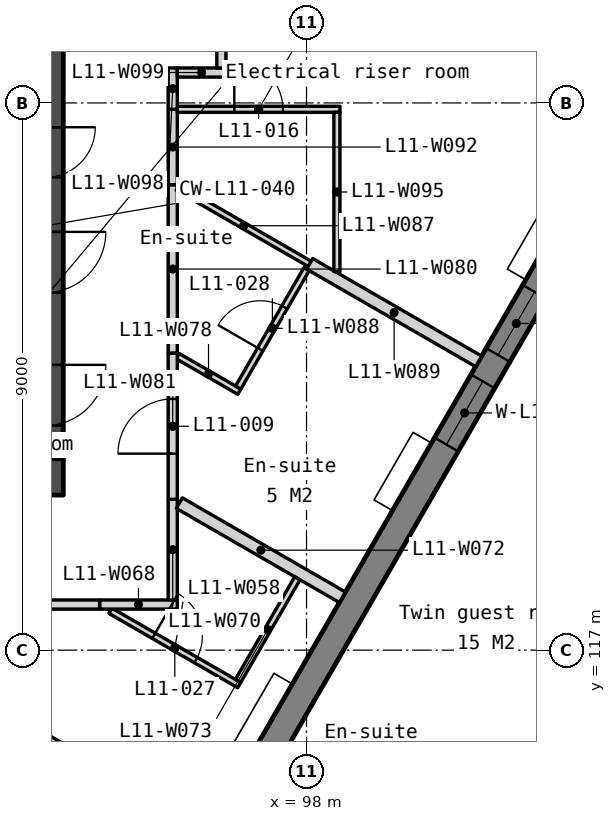
"""IFC4 building model, lengths in metres.
Left out: names, types, materials, properties, quantities, classifications, styles, units other than length and angle.
Written with IfcOpenShell. Run it as: python <this file> out.ifc"""

import sys

from ifc_helpers import new_model, si_unit, direction, frame, frame_2d, origin, place, context, subcontext, project, spatial, polyline, rectangle, outline, extrude, element, fill, save


model = new_model("IFC4")
c1 = context("Model", 3, precision=1e-05, world=origin(), true_north=direction((0.0, 1.0)))
c2 = subcontext(c1, "Body", "Model", "MODEL_VIEW")
j1 = project(units=[si_unit("LENGTHUNIT", "METRE"), si_unit("PLANEANGLEUNIT", "RADIAN")], contexts=[c1])
p1 = place(None, origin())
s1 = spatial("IfcSite", under=j1, at=p1, CompositionType="ELEMENT")
p2 = place(p1, origin())
s2 = spatial("IfcBuilding", under=s1, at=p2, CompositionType="ELEMENT")
p3 = place(p2, frame((0.0, 0.0, 52.5)))
s3 = spatial("IfcBuildingStorey", under=s2, at=p3, CompositionType="ELEMENT", Elevation=52.5)
p4 = place(p3, frame((66.0, 119.85, 0.0), z_axis=(0.0, 0.0, 1.0), x_axis=(1.0, 0.0, 0.0)))
e1 = element("IfcWall", 1, at=p4, inside=s3, PredefinedType="SOLIDWALL", context=c2, shape_type="SweptSolid", body=[
    extrude(rectangle(XDim=28.0, YDim=0.6, at=frame_2d((14.0, 0.0))), origin(), (0.0, 0.0, 1.0), 3.35),
])
p5 = place(p4, frame((6.825, 0.0, 0.0)))
e2 = element("IfcOpeningElement", 2, at=p5, cuts=e1, PredefinedType="OPENING", context=c2, shape_type="SweptSolid", body=[
    extrude(rectangle(XDim=1.8, YDim=2.1, at=frame_2d((0.9, 1.05))), frame((0.0, 0.31, 0.0), z_axis=(0.0, -1.0, 0.0), x_axis=(1.0, 0.0, 0.0)), (0.0, 0.0, 1.0), 0.62),
])
p6 = place(p4, frame((15.85, 0.0, 0.0)))
e3 = element("IfcOpeningElement", 3, at=p6, cuts=e1, PredefinedType="OPENING", context=c2, shape_type="SweptSolid", body=[
    extrude(rectangle(XDim=1.5, YDim=2.1, at=frame_2d((0.75, 1.05))), frame((0.0, 0.31, 0.0), z_axis=(0.0, -1.0, 0.0), x_axis=(1.0, 0.0, 0.0)), (0.0, 0.0, 1.0), 0.62),
])
p7 = place(p4, frame((19.375, 0.0, 0.0)))
e4 = element("IfcOpeningElement", 4, at=p7, cuts=e1, PredefinedType="OPENING", context=c2, shape_type="SweptSolid", body=[
    extrude(rectangle(XDim=1.8, YDim=2.1, at=frame_2d((0.9, 1.05))), frame((0.0, 0.31, 0.0), z_axis=(0.0, -1.0, 0.0), x_axis=(1.0, 0.0, 0.0)), (0.0, 0.0, 1.0), 0.62),
])
p8 = place(p4, frame((4.425, 0.0, 0.0)))
e5 = element("IfcOpeningElement", 5, at=p8, cuts=e1, PredefinedType="OPENING", context=c2, shape_type="SweptSolid", body=[
    extrude(rectangle(XDim=1.0, YDim=2.1, at=frame_2d((0.5, 1.05))), frame((0.0, 0.31, 0.0), z_axis=(0.0, -1.0, 0.0), x_axis=(1.0, 0.0, 0.0)), (0.0, 0.0, 1.0), 0.62),
])
p9 = place(p4, frame((9.783, 0.0, 0.0)))
e6 = element("IfcOpeningElement", 6, at=p9, cuts=e1, PredefinedType="OPENING", context=c2, shape_type="SweptSolid", body=[
    extrude(rectangle(XDim=1.0, YDim=2.1, at=frame_2d((0.5, 1.05))), frame((0.0, 0.31, 0.0), z_axis=(0.0, -1.0, 0.0), x_axis=(1.0, 0.0, 0.0)), (0.0, 0.0, 1.0), 0.62),
])
p10 = place(p4, frame((11.525, 0.0, 0.0)))
e7 = element("IfcOpeningElement", 7, at=p10, cuts=e1, PredefinedType="OPENING", context=c2, shape_type="SweptSolid", body=[
    extrude(rectangle(XDim=1.0, YDim=2.1, at=frame_2d((0.5, 1.05))), frame((0.0, 0.31, 0.0), z_axis=(0.0, -1.0, 0.0), x_axis=(1.0, 0.0, 0.0)), (0.0, 0.0, 1.0), 0.62),
])
p11 = place(p4, frame((13.658, 0.0, 0.0)))
e8 = element("IfcOpeningElement", 8, at=p11, cuts=e1, PredefinedType="OPENING", context=c2, shape_type="SweptSolid", body=[
    extrude(rectangle(XDim=1.0, YDim=2.1, at=frame_2d((0.5, 1.05))), frame((0.0, 0.31, 0.0), z_axis=(0.0, -1.0, 0.0), x_axis=(1.0, 0.0, 0.0)), (0.0, 0.0, 1.0), 0.62),
])
p12 = place(p4, frame((21.725, 0.0, 0.0)))
e9 = element("IfcOpeningElement", 9, at=p12, cuts=e1, PredefinedType="OPENING", context=c2, shape_type="SweptSolid", body=[
    extrude(rectangle(XDim=1.0, YDim=2.1, at=frame_2d((0.5, 1.05))), frame((0.0, 0.31, 0.0), z_axis=(0.0, -1.0, 0.0), x_axis=(1.0, 0.0, 0.0)), (0.0, 0.0, 1.0), 0.62),
])
p13 = place(p4, frame((23.425, 0.0, 0.0)))
e10 = element("IfcOpeningElement", 10, at=p13, cuts=e1, PredefinedType="OPENING", context=c2, shape_type="SweptSolid", body=[
    extrude(rectangle(XDim=1.0, YDim=2.1, at=frame_2d((0.5, 1.05))), frame((0.0, 0.31, 0.0), z_axis=(0.0, -1.0, 0.0), x_axis=(1.0, 0.0, 0.0)), (0.0, 0.0, 1.0), 0.62),
])
p14 = place(p3, frame((93.7, 133.95, 0.0), z_axis=(0.0, 0.0, 1.0), x_axis=(0.0, -1.0, 0.0)))
e11 = element("IfcWall", 11, at=p14, inside=s3, PredefinedType="SOLIDWALL", context=c2, shape_type="SweptSolid", body=[
    extrude(rectangle(XDim=13.8, YDim=0.6, at=frame_2d((6.9, 0.0))), origin(), (0.0, 0.0, 1.0), 3.35),
])
p15 = place(p14, frame((0.6, 0.0, 0.0)))
e12 = element("IfcOpeningElement", 12, at=p15, cuts=e11, PredefinedType="OPENING", context=c2, shape_type="SweptSolid", body=[
    extrude(rectangle(XDim=1.1, YDim=2.1, at=frame_2d((0.55, 1.05))), frame((0.0, 0.31, 0.0), z_axis=(0.0, -1.0, 0.0), x_axis=(1.0, 0.0, 0.0)), (0.0, 0.0, 1.0), 0.62),
])
p16 = place(p14, frame((8.35, 0.0, 0.0)))
e13 = element("IfcOpeningElement", 13, at=p16, cuts=e11, PredefinedType="OPENING", context=c2, shape_type="SweptSolid", body=[
    extrude(rectangle(XDim=0.826, YDim=2.1, at=frame_2d((0.413, 1.05))), frame((0.0, 0.31, 0.0), z_axis=(0.0, -1.0, 0.0), x_axis=(1.0, 0.0, 0.0)), (0.0, 0.0, 1.0), 0.62),
])
p17 = place(p14, frame((10.071, 0.0, 0.0)))
e14 = element("IfcOpeningElement", 14, at=p17, cuts=e11, PredefinedType="OPENING", context=c2, shape_type="SweptSolid", body=[
    extrude(rectangle(XDim=1.0, YDim=2.1, at=frame_2d((0.5, 1.05))), frame((0.0, 0.31, 0.0), z_axis=(0.0, -1.0, 0.0), x_axis=(1.0, 0.0, 0.0)), (0.0, 0.0, 1.0), 0.62),
])
p18 = place(p14, frame((12.258, 0.0, 0.0)))
e15 = element("IfcOpeningElement", 15, at=p18, cuts=e11, PredefinedType="OPENING", context=c2, shape_type="SweptSolid", body=[
    extrude(rectangle(XDim=1.0, YDim=2.1, at=frame_2d((0.5, 1.05))), frame((0.0, 0.31, 0.0), z_axis=(0.0, -1.0, 0.0), x_axis=(1.0, 0.0, 0.0)), (0.0, 0.0, 1.0), 0.62),
])
p19 = place(p3, frame((83.105, 90.599, -0.15), z_axis=(0.0, 0.0, 1.0), x_axis=(0.499999201451, 0.866025864826, 0.0)))
e16 = element("IfcWall", 16, at=p19, inside=s3, PredefinedType="SOLIDWALL", context=c2, shape_type="SweptSolid", body=[
    extrude(outline(polyline([(44.8, 0.0), (44.8, 3.5), (0.0, 3.5), (0.0, 0.0), (44.8, 0.0)])), frame((0.0, 0.225, 0.0), z_axis=(0.0, -1.0, 0.0), x_axis=(1.0, 0.0, 0.0)), (0.0, 0.0, 1.0), 0.45),
])
p20 = place(p19, frame((0.722, 0.0, 1.05)))
e17 = element("IfcOpeningElement", 17, at=p20, cuts=e16, PredefinedType="OPENING", context=c2, shape_type="SweptSolid", body=[
    extrude(rectangle(XDim=1.2, YDim=1.5, at=frame_2d((0.6, 0.75))), frame((0.0, 0.235, 0.0), z_axis=(0.0, -1.0, 0.0), x_axis=(1.0, 0.0, 0.0)), (0.0, 0.0, 1.0), 0.47),
])
p21 = place(p19, frame((7.51, 0.0, 1.05)))
e18 = element("IfcOpeningElement", 18, at=p21, cuts=e16, PredefinedType="OPENING", context=c2, shape_type="SweptSolid", body=[
    extrude(rectangle(XDim=1.2, YDim=1.5, at=frame_2d((0.6, 0.75))), frame((0.0, 0.235, 0.0), z_axis=(0.0, -1.0, 0.0), x_axis=(1.0, 0.0, 0.0)), (0.0, 0.0, 1.0), 0.47),
])
p22 = place(p19, frame((9.21, 0.0, 1.05)))
e19 = element("IfcOpeningElement", 19, at=p22, cuts=e16, PredefinedType="OPENING", context=c2, shape_type="SweptSolid", body=[
    extrude(rectangle(XDim=1.2, YDim=1.5, at=frame_2d((0.6, 0.75))), frame((0.0, 0.235, 0.0), z_axis=(0.0, -1.0, 0.0), x_axis=(1.0, 0.0, 0.0)), (0.0, 0.0, 1.0), 0.47),
])
p23 = place(p19, frame((16.47, 0.0, 1.05)))
e20 = element("IfcOpeningElement", 20, at=p23, cuts=e16, PredefinedType="OPENING", context=c2, shape_type="SweptSolid", body=[
    extrude(rectangle(XDim=1.2, YDim=1.5, at=frame_2d((0.6, 0.75))), frame((0.0, 0.235, 0.0), z_axis=(0.0, -1.0, 0.0), x_axis=(1.0, 0.0, 0.0)), (0.0, 0.0, 1.0), 0.47),
])
p24 = place(p19, frame((18.17, 0.0, 1.05)))
e21 = element("IfcOpeningElement", 21, at=p24, cuts=e16, PredefinedType="OPENING", context=c2, shape_type="SweptSolid", body=[
    extrude(rectangle(XDim=1.2, YDim=1.5, at=frame_2d((0.6, 0.75))), frame((0.0, 0.235, 0.0), z_axis=(0.0, -1.0, 0.0), x_axis=(1.0, 0.0, 0.0)), (0.0, 0.0, 1.0), 0.47),
])
p25 = place(p19, frame((25.43, 0.0, 1.05)))
e22 = element("IfcOpeningElement", 22, at=p25, cuts=e16, PredefinedType="OPENING", context=c2, shape_type="SweptSolid", body=[
    extrude(rectangle(XDim=1.2, YDim=1.5, at=frame_2d((0.6, 0.75))), frame((0.0, 0.235, 0.0), z_axis=(0.0, -1.0, 0.0), x_axis=(1.0, 0.0, 0.0)), (0.0, 0.0, 1.0), 0.47),
])
p26 = place(p19, frame((27.13, 0.0, 1.05)))
e23 = element("IfcOpeningElement", 23, at=p26, cuts=e16, PredefinedType="OPENING", context=c2, shape_type="SweptSolid", body=[
    extrude(rectangle(XDim=1.2, YDim=1.5, at=frame_2d((0.6, 0.75))), frame((0.0, 0.235, 0.0), z_axis=(0.0, -1.0, 0.0), x_axis=(1.0, 0.0, 0.0)), (0.0, 0.0, 1.0), 0.47),
])
p27 = place(p19, frame((34.39, 0.0, 1.05)))
e24 = element("IfcOpeningElement", 24, at=p27, cuts=e16, PredefinedType="OPENING", context=c2, shape_type="SweptSolid", body=[
    extrude(rectangle(XDim=1.2, YDim=1.5, at=frame_2d((0.6, 0.75))), frame((0.0, 0.235, 0.0), z_axis=(0.0, -1.0, 0.0), x_axis=(1.0, 0.0, 0.0)), (0.0, 0.0, 1.0), 0.47),
])
p28 = place(p19, frame((36.09, 0.0, 1.05)))
e25 = element("IfcOpeningElement", 25, at=p28, cuts=e16, PredefinedType="OPENING", context=c2, shape_type="SweptSolid", body=[
    extrude(rectangle(XDim=1.2, YDim=1.5, at=frame_2d((0.6, 0.75))), frame((0.0, 0.235, 0.0), z_axis=(0.0, -1.0, 0.0), x_axis=(1.0, 0.0, 0.0)), (0.0, 0.0, 1.0), 0.47),
])
p29 = place(p19, frame((42.878, 0.0, 1.05)))
e26 = element("IfcOpeningElement", 26, at=p29, cuts=e16, PredefinedType="OPENING", context=c2, shape_type="SweptSolid", body=[
    extrude(rectangle(XDim=1.2, YDim=1.5, at=frame_2d((0.6, 0.75))), frame((0.0, 0.235, 0.0), z_axis=(0.0, -1.0, 0.0), x_axis=(1.0, 0.0, 0.0)), (0.0, 0.0, 1.0), 0.47),
])
p30 = place(p3, frame((92.497, 116.215, 0.0), z_axis=(0.0, 0.0, 1.0), x_axis=(0.866012907634, -0.500021643343, 0.0)))
e27 = element("IfcWall", 27, at=p30, inside=s3, PredefinedType="PARTITIONING", context=c2, shape_type="SweptSolid", body=[
    extrude(rectangle(XDim=4.45, YDim=0.2, at=frame_2d((2.225, 0.0))), origin(), (0.0, 0.0, 1.0), 3.35),
])
p31 = place(p3, frame((94.775, 117.647, 0.0), z_axis=(0.0, 0.0, 1.0), x_axis=(0.86604092097, -0.499973122483, 0.0)))
e28 = element("IfcWall", 28, at=p31, inside=s3, PredefinedType="PARTITIONING", context=c2, shape_type="SweptSolid", body=[
    extrude(rectangle(XDim=2.445, YDim=0.1, at=frame_2d((1.223, 0.0))), origin(), (0.0, 0.0, 1.0), 3.35),
])
p32 = place(p31, frame((0.823, 0.0, 0.0)))
e29 = element("IfcOpeningElement", 29, at=p32, cuts=e28, PredefinedType="OPENING", context=c2, shape_type="SweptSolid", body=[
    extrude(rectangle(XDim=0.8, YDim=2.1, at=frame_2d((0.4, 1.05))), frame((0.0, 0.06, 0.0), z_axis=(0.0, -1.0, 0.0), x_axis=(1.0, 0.0, 0.0)), (0.0, 0.0, 1.0), 0.12),
])
p33 = place(p3, frame((94.598, 117.75, 0.0), z_axis=(0.0, 0.0, 1.0), x_axis=(1.0, 0.0, 0.0)))
e30 = element("IfcWall", 30, at=p33, inside=s3, PredefinedType="PARTITIONING", context=c2, shape_type="SweptSolid", body=[
    extrude(rectangle(XDim=1.277, YDim=0.15, at=frame_2d((0.639, 0.0))), origin(), (0.0, 0.0, 1.0), 3.35),
])
p34 = place(p3, frame((90.034, 117.75, 0.0), z_axis=(0.0, 0.0, 1.0), x_axis=(1.0, 0.0, 0.0)))
e31 = element("IfcWall", 31, at=p34, inside=s3, PredefinedType="PARTITIONING", context=c2, shape_type="SweptSolid", body=[
    extrude(rectangle(XDim=4.564, YDim=0.15, at=frame_2d((2.282, 0.0))), origin(), (0.0, 0.0, 1.0), 3.35),
])
p35 = place(p34, frame((1.832, 0.0, 0.0)))
e32 = element("IfcOpeningElement", 32, at=p35, cuts=e31, PredefinedType="OPENING", context=c2, shape_type="SweptSolid", body=[
    extrude(rectangle(XDim=0.9, YDim=2.1, at=frame_2d((0.45, 1.05))), frame((0.0, 0.085, 0.0), z_axis=(0.0, -1.0, 0.0), x_axis=(1.0, 0.0, 0.0)), (0.0, 0.0, 1.0), 0.17),
])
p36 = place(p3, frame((95.8, 117.825, 0.0), z_axis=(0.0, 0.0, 1.0), x_axis=(0.0, 1.0, 0.0)))
e33 = element("IfcWall", 33, at=p36, inside=s3, PredefinedType="PARTITIONING", context=c2, shape_type="SweptSolid", body=[
    extrude(rectangle(XDim=1.656, YDim=0.15, at=frame_2d((0.828, 0.0))), origin(), (0.0, 0.0, 1.0), 3.35),
])
p37 = place(p3, frame((95.908, 119.418, 0.0), z_axis=(0.0, 0.0, 1.0), x_axis=(0.866051688794, -0.499954470265, 0.0)))
e34 = element("IfcWall", 34, at=p37, inside=s3, PredefinedType="PARTITIONING", context=c2, shape_type="SweptSolid", body=[
    extrude(rectangle(XDim=3.097, YDim=0.2, at=frame_2d((1.548, 0.0))), origin(), (0.0, 0.0, 1.0), 3.35),
])
p38 = place(p3, frame((96.875, 116.493, 0.0), z_axis=(0.0, 0.0, 1.0), x_axis=(0.500043961785, 0.866000020948, 0.0)))
e35 = element("IfcWall", 35, at=p38, inside=s3, PredefinedType="PARTITIONING", context=c2, shape_type="SweptSolid", body=[
    extrude(rectangle(XDim=1.95, YDim=0.1, at=frame_2d((0.975, 0.0))), origin(), (0.0, 0.0, 1.0), 3.35),
])
p39 = place(p3, frame((95.882, 121.835, 0.0), z_axis=(0.0, 0.0, 1.0), x_axis=(0.86601174498, -0.500023656998, 0.0)))
e36 = element("IfcWall", 36, at=p39, inside=s3, PredefinedType="PARTITIONING", context=c2, shape_type="SweptSolid", body=[
    extrude(rectangle(XDim=1.169, YDim=0.1, at=frame_2d((0.585, 0.0))), origin(), (0.0, 0.0, 1.0), 3.35),
])
p40 = place(p3, frame((95.8, 121.883, 0.0), z_axis=(0.0, 0.0, 1.0), x_axis=(0.0, 1.0, 0.0)))
e37 = element("IfcWall", 37, at=p40, inside=s3, PredefinedType="PARTITIONING", context=c2, shape_type="SweptSolid", body=[
    extrude(rectangle(XDim=2.771, YDim=0.15, at=frame_2d((1.386, 0.0))), origin(), (0.0, 0.0, 1.0), 3.35),
])
p41 = place(p3, frame((95.8, 119.481, 0.0), z_axis=(0.0, 0.0, 1.0), x_axis=(0.0, 1.0, 0.0)))
e38 = element("IfcWall", 38, at=p41, inside=s3, PredefinedType="PARTITIONING", context=c2, shape_type="SweptSolid", body=[
    extrude(rectangle(XDim=2.402, YDim=0.15, at=frame_2d((1.201, 0.0))), origin(), (0.0, 0.0, 1.0), 3.35),
])
p42 = place(p41, frame((0.751, 0.0, 0.0)))
e39 = element("IfcOpeningElement", 39, at=p42, cuts=e38, PredefinedType="OPENING", context=c2, shape_type="SweptSolid", body=[
    extrude(rectangle(XDim=0.9, YDim=2.1, at=frame_2d((0.45, 1.05))), frame((0.0, 0.085, 0.0), z_axis=(0.0, -1.0, 0.0), x_axis=(1.0, 0.0, 0.0)), (0.0, 0.0, 1.0), 0.17),
])
p43 = place(p3, frame((95.882, 124.606, 0.0), z_axis=(0.0, 0.0, 1.0), x_axis=(0.866039519639, -0.499975549825, 0.0)))
e40 = element("IfcWall", 40, at=p43, inside=s3, PredefinedType="PARTITIONING", context=c2, shape_type="SweptSolid", body=[
    extrude(rectangle(XDim=2.505, YDim=0.1, at=frame_2d((1.252, 0.0))), origin(), (0.0, 0.0, 1.0), 3.35),
])
p44 = place(p3, frame((96.877, 121.319, 0.0), z_axis=(0.0, 0.0, 1.0), x_axis=(0.499966648284, 0.866044658551, 0.0)))
e41 = element("IfcWall", 41, at=p44, inside=s3, PredefinedType="PARTITIONING", context=c2, shape_type="SweptSolid", body=[
    extrude(rectangle(XDim=2.25, YDim=0.1, at=frame_2d((1.125, 0.0))), origin(), (0.0, 0.0, 1.0), 3.35),
])
p45 = place(p44, frame((0.725, 0.0, 0.0)))
e42 = element("IfcOpeningElement", 42, at=p45, cuts=e41, PredefinedType="OPENING", context=c2, shape_type="SweptSolid", body=[
    extrude(rectangle(XDim=0.8, YDim=2.1, at=frame_2d((0.4, 1.05))), frame((0.0, 0.06, 0.0), z_axis=(0.0, -1.0, 0.0), x_axis=(1.0, 0.0, 0.0)), (0.0, 0.0, 1.0), 0.12),
])
p46 = place(p3, frame((98.052, 123.354, 0.0), z_axis=(0.0, 0.0, 1.0), x_axis=(0.866019585306, -0.500010077765, 0.0)))
e43 = element("IfcWall", 43, at=p46, inside=s3, PredefinedType="PARTITIONING", context=c2, shape_type="SweptSolid", body=[
    extrude(rectangle(XDim=3.208, YDim=0.2, at=frame_2d((1.604, 0.0))), origin(), (0.0, 0.0, 1.0), 3.35),
])
p47 = place(p3, frame((95.8, 124.654, 0.0), z_axis=(0.0, 0.0, 1.0), x_axis=(0.0, 1.0, 0.0)))
e44 = element("IfcWall", 44, at=p47, inside=s3, PredefinedType="PARTITIONING", context=c2, shape_type="SweptSolid", body=[
    extrude(rectangle(XDim=1.241, YDim=0.15, at=frame_2d((0.621, 0.0))), origin(), (0.0, 0.0, 1.0), 3.35),
])
p48 = place(p3, frame((95.875, 125.895, 0.0), z_axis=(0.0, 0.0, 1.0), x_axis=(1.0, 0.0, 0.0)))
e45 = element("IfcWall", 45, at=p48, inside=s3, PredefinedType="PARTITIONING", context=c2, shape_type="SweptSolid", body=[
    extrude(rectangle(XDim=2.675, YDim=0.1, at=frame_2d((1.337, 0.0))), origin(), (0.0, 0.0, 1.0), 3.35),
])
p49 = place(p48, frame((0.938, 0.0, 0.0)))
e46 = element("IfcOpeningElement", 46, at=p49, cuts=e45, PredefinedType="OPENING", context=c2, shape_type="SweptSolid", body=[
    extrude(rectangle(XDim=0.8, YDim=2.1, at=frame_2d((0.4, 1.05))), frame((0.0, 0.06, 0.0), z_axis=(0.0, -1.0, 0.0), x_axis=(1.0, 0.0, 0.0)), (0.0, 0.0, 1.0), 0.12),
])
p50 = place(p3, frame((98.5, 123.225, 0.0), z_axis=(0.0, 0.0, 1.0), x_axis=(0.0, 1.0, 0.0)))
e47 = element("IfcWall", 47, at=p50, inside=s3, PredefinedType="PARTITIONING", context=c2, shape_type="SweptSolid", body=[
    extrude(rectangle(XDim=2.62, YDim=0.1, at=frame_2d((1.31, 0.0))), origin(), (0.0, 0.0, 1.0), 3.35),
])
p51 = place(p3, frame((95.8, 125.895, 0.0), z_axis=(0.0, 0.0, 1.0), x_axis=(0.0, 1.0, 0.0)))
e48 = element("IfcWall", 48, at=p51, inside=s3, PredefinedType="PARTITIONING", context=c2, shape_type="SweptSolid", body=[
    extrude(rectangle(XDim=0.68, YDim=0.15, at=frame_2d((0.34, 0.0))), origin(), (0.0, 0.0, 1.0), 3.35),
])
p52 = place(p3, frame((95.875, 126.5, 0.0), z_axis=(0.0, 0.0, 1.0), x_axis=(1.0, 0.0, 0.0)))
e49 = element("IfcWall", 49, at=p52, inside=s3, PredefinedType="PARTITIONING", context=c2, shape_type="SweptSolid", body=[
    extrude(rectangle(XDim=0.8, YDim=0.15, at=frame_2d((0.4, 0.0))), origin(), (0.0, 0.0, 1.0), 3.35),
])
p53 = place(p3, frame((96.6, 133.925, 0.0), z_axis=(0.0, 0.0, 1.0), x_axis=(6.643194e-05, -0.999999997793, 0.0)))
e50 = element("IfcWall", 50, at=p53, inside=s3, PredefinedType="PARTITIONING", context=c2, shape_type="SweptSolid", body=[
    extrude(rectangle(XDim=7.35, YDim=0.15, at=frame_2d((3.675, 0.0))), origin(), (0.0, 0.0, 1.0), 3.35),
])
p54 = place(p53, frame((3.175, 0.0, 0.0)))
e51 = element("IfcOpeningElement", 51, at=p54, cuts=e50, PredefinedType="OPENING", context=c2, shape_type="SweptSolid", body=[
    extrude(rectangle(XDim=1.0, YDim=2.1, at=frame_2d((0.5, 1.05))), frame((0.0, 0.085, 0.0), z_axis=(0.0, -1.0, 0.0), x_axis=(1.0, 0.0, 0.0)), (0.0, 0.0, 1.0), 0.17),
])
p55 = place(p27, origin())
e52 = element("IfcWindow", 52, at=p55, inside=s3, PartitioningType="SINGLE_PANEL", PredefinedType="WINDOW", context=c2, shape_type="SweptSolid", body=[
    extrude(rectangle(XDim=1.2, YDim=1.5, at=frame_2d((0.6, 0.75))), frame((0.0, 0.03, 0.0), z_axis=(0.0, -1.0, 0.0), x_axis=(1.0, 0.0, 0.0)), (0.0, 0.0, 1.0), 0.06),
])
fill(e24, e52)
p56 = place(p28, origin())
e53 = element("IfcWindow", 53, at=p56, inside=s3, PartitioningType="SINGLE_PANEL", PredefinedType="WINDOW", context=c2, shape_type="SweptSolid", body=[
    extrude(rectangle(XDim=1.2, YDim=1.5, at=frame_2d((0.6, 0.75))), frame((0.0, 0.03, 0.0), z_axis=(0.0, -1.0, 0.0), x_axis=(1.0, 0.0, 0.0)), (0.0, 0.0, 1.0), 0.06),
])
fill(e25, e53)
p57 = place(p42, origin())
e54 = element("IfcDoor", 54, at=p57, inside=s3, OperationType="SINGLE_SWING_LEFT", PredefinedType="DOOR", context=c2, shape_type="SweptSolid", body=[
    extrude(rectangle(XDim=0.9, YDim=2.1, at=frame_2d((0.45, 1.05))), frame((0.0, 0.025, 0.0), z_axis=(0.0, -1.0, 0.0), x_axis=(1.0, 0.0, 0.0)), (0.0, 0.0, 1.0), 0.05),
])
fill(e39, e54)
p58 = place(p49, origin())
e55 = element("IfcDoor", 55, at=p58, inside=s3, OperationType="SINGLE_SWING_LEFT", PredefinedType="DOOR", context=c2, shape_type="SweptSolid", body=[
    extrude(rectangle(XDim=0.8, YDim=2.1, at=frame_2d((0.4, 1.05))), frame((0.0, 0.025, 0.0), z_axis=(0.0, -1.0, 0.0), x_axis=(1.0, 0.0, 0.0)), (0.0, 0.0, 1.0), 0.05),
])
fill(e46, e55)
p59 = place(p32, origin())
e56 = element("IfcDoor", 56, at=p59, inside=s3, OperationType="SINGLE_SWING_LEFT", PredefinedType="DOOR", context=c2, shape_type="SweptSolid", body=[
    extrude(rectangle(XDim=0.8, YDim=2.1, at=frame_2d((0.4, 1.05))), frame((0.0, 0.025, 0.0), z_axis=(0.0, -1.0, 0.0), x_axis=(1.0, 0.0, 0.0)), (0.0, 0.0, 1.0), 0.05),
])
fill(e29, e56)
p60 = place(p45, origin())
e57 = element("IfcDoor", 57, at=p60, inside=s3, OperationType="SINGLE_SWING_LEFT", PredefinedType="DOOR", context=c2, shape_type="SweptSolid", body=[
    extrude(rectangle(XDim=0.8, YDim=2.1, at=frame_2d((0.4, 1.05))), frame((0.0, 0.025, 0.0), z_axis=(0.0, -1.0, 0.0), x_axis=(1.0, 0.0, 0.0)), (0.0, 0.0, 1.0), 0.05),
])
fill(e42, e57)
save(model, sys.argv[1])
